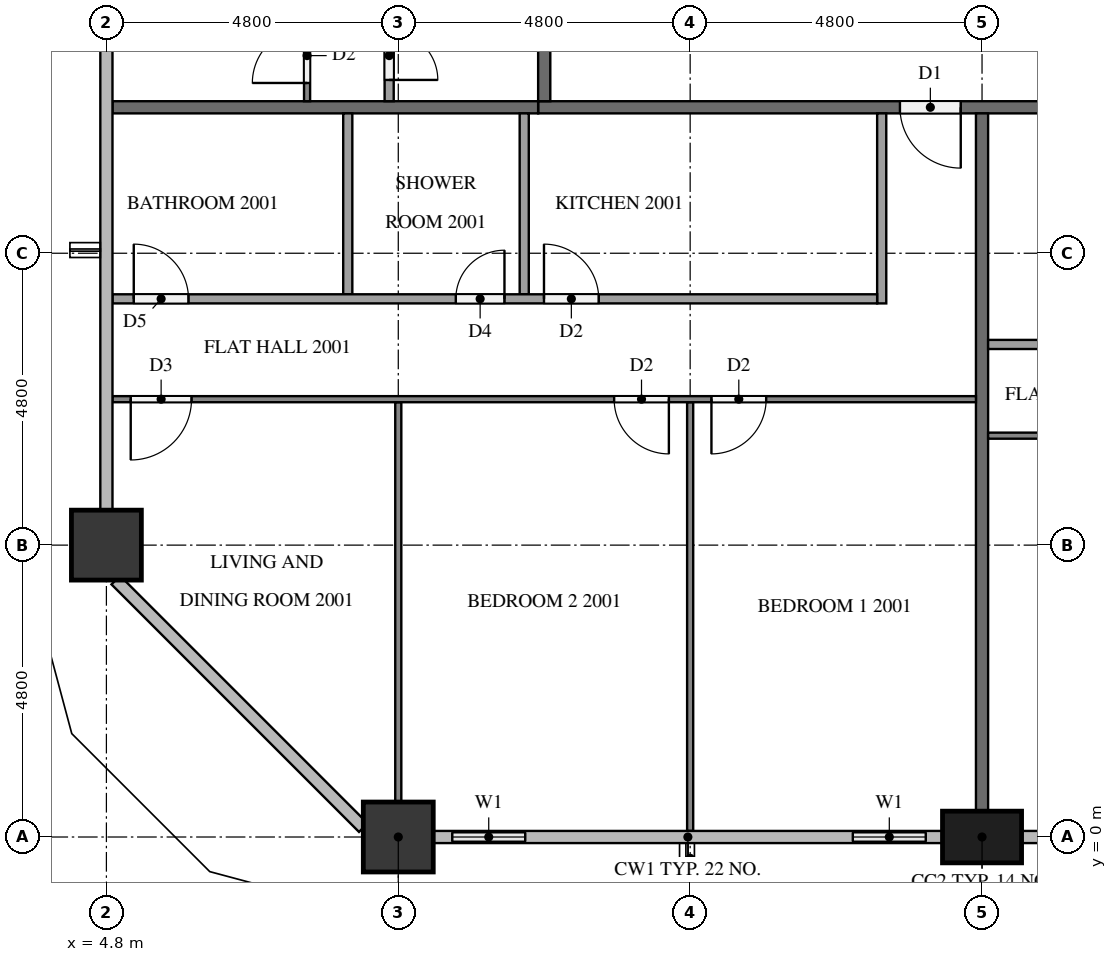
"""IFC4 building model, lengths in metres.
Left out: names, types, materials, properties, quantities, classifications, styles, units other than length and angle.
Written with IfcOpenShell. Run it as: python <this file> out.ifc"""

import sys

from ifc_helpers import new_model, si_unit, direction, frame, frame_2d, origin, origin_2d, place, context, subcontext, project, spatial, rectangle, extrude, element, fill, save


model = new_model("IFC4")
c1 = context("Model", 3, precision=1e-05, world=origin(), true_north=direction((0.0, 1.0)))
c2 = subcontext(c1, "Body", "Model", "MODEL_VIEW")
j1 = project(units=[si_unit("LENGTHUNIT", "METRE"), si_unit("PLANEANGLEUNIT", "RADIAN")], contexts=[c1])
p1 = place(None, origin())
s1 = spatial("IfcSite", under=j1, at=p1, CompositionType="ELEMENT")
p2 = place(p1, origin())
s2 = spatial("IfcBuilding", under=s1, at=p2, CompositionType="ELEMENT")
p3 = place(p2, frame((0.0, 0.0, 80.3)))
s3 = spatial("IfcBuildingStorey", under=s2, at=p3, CompositionType="ELEMENT", Elevation=80.3)
p4 = place(p3, frame((9.6, 0.0, 0.0), z_axis=(0.0, 0.0, 1.0), x_axis=(1.0, 0.0, 0.0)))
e1 = element("IfcColumn", 1, at=p4, inside=s3, PredefinedType="COLUMN", context=c2, shape_type="SweptSolid", body=[
    extrude(rectangle(XDim=1.15, YDim=1.15, at=origin_2d()), origin(), (0.0, 0.0, 1.0), 3.1),
])
p5 = place(p3, frame((19.2, 0.0, 0.0), z_axis=(0.0, 0.0, 1.0), x_axis=(1.0, 0.0, 0.0)))
e2 = element("IfcColumn", 2, at=p5, inside=s3, PredefinedType="COLUMN", context=c2, shape_type="SweptSolid", body=[
    extrude(rectangle(XDim=1.3, YDim=0.85, at=origin_2d()), origin(), (0.0, 0.0, 1.0), 3.1),
])
p6 = place(p3, frame((4.8, 4.8, 0.0), z_axis=(0.0, 0.0, 1.0), x_axis=(1.0, 0.0, 0.0)))
e3 = element("IfcColumn", 3, at=p6, inside=s3, PredefinedType="COLUMN", context=c2, shape_type="SweptSolid", body=[
    extrude(rectangle(XDim=1.15, YDim=1.15, at=origin_2d()), origin(), (0.0, 0.0, 1.0), 3.1),
])
p7 = place(p3, frame((10.175, 0.0, 0.0), z_axis=(0.0, 0.0, 1.0), x_axis=(1.0, 0.0, 0.0)))
e4 = element("IfcWall", 4, at=p7, inside=s3, PredefinedType="SOLIDWALL", context=c2, shape_type="SweptSolid", body=[
    extrude(rectangle(XDim=1.825, YDim=0.15, at=frame_2d((0.913, 0.0))), origin(), (0.0, 0.0, 1.0), 3.1),
])
p8 = place(p7, frame((0.312, 0.0, 0.9)))
e5 = element("IfcOpeningElement", 5, at=p8, cuts=e4, PredefinedType="OPENING", context=c2, shape_type="SweptSolid", body=[
    extrude(rectangle(XDim=1.2, YDim=1.4, at=frame_2d((0.6, 0.7))), frame((0.0, 0.085, 0.0), z_axis=(0.0, -1.0, 0.0), x_axis=(1.0, 0.0, 0.0)), (0.0, 0.0, 1.0), 0.17),
])
p9 = place(p3, frame((16.8, 0.0, 0.0), z_axis=(0.0, 0.0, 1.0), x_axis=(1.0, 0.0, 0.0)))
e6 = element("IfcWall", 6, at=p9, inside=s3, PredefinedType="SOLIDWALL", context=c2, shape_type="SweptSolid", body=[
    extrude(rectangle(XDim=1.75, YDim=0.15, at=frame_2d((0.875, 0.0))), origin(), (0.0, 0.0, 1.0), 3.1),
])
p10 = place(p9, frame((0.275, 0.0, 0.9)))
e7 = element("IfcOpeningElement", 7, at=p10, cuts=e6, PredefinedType="OPENING", context=c2, shape_type="SweptSolid", body=[
    extrude(rectangle(XDim=1.2, YDim=1.4, at=frame_2d((0.6, 0.7))), frame((0.0, 0.085, 0.0), z_axis=(0.0, -1.0, 0.0), x_axis=(1.0, 0.0, 0.0)), (0.0, 0.0, 1.0), 0.17),
])
p11 = place(p3, frame((19.85, 0.0, 0.0), z_axis=(0.0, 0.0, 1.0), x_axis=(1.0, 0.0, 0.0)))
e8 = element("IfcWall", 8, at=p11, inside=s3, PredefinedType="SOLIDWALL", context=c2, shape_type="SweptSolid", body=[
    extrude(rectangle(XDim=1.75, YDim=0.15, at=frame_2d((0.875, 0.0))), origin(), (0.0, 0.0, 1.0), 3.1),
])
p12 = place(p11, frame((0.275, 0.0, 0.9)))
e9 = element("IfcOpeningElement", 9, at=p12, cuts=e8, PredefinedType="OPENING", context=c2, shape_type="SweptSolid", body=[
    extrude(rectangle(XDim=1.2, YDim=1.4, at=frame_2d((0.6, 0.7))), frame((0.0, 0.085, 0.0), z_axis=(0.0, -1.0, 0.0), x_axis=(1.0, 0.0, 0.0)), (0.0, 0.0, 1.0), 0.17),
])
p13 = place(p3, frame((50.5, 12.0, 0.0), z_axis=(0.0, 0.0, 1.0), x_axis=(-1.0, 0.0, 0.0)))
e10 = element("IfcWall", 10, at=p13, inside=s3, PredefinedType="PARTITIONING", context=c2, shape_type="SweptSolid", body=[
    extrude(rectangle(XDim=38.6, YDim=0.2, at=frame_2d((19.3, 0.0))), origin(), (0.0, 0.0, 1.0), 3.1),
])
p14 = place(p13, frame((31.65, 0.0, 0.0)))
e11 = element("IfcOpeningElement", 11, at=p14, cuts=e10, PredefinedType="OPENING", context=c2, shape_type="SweptSolid", body=[
    extrude(rectangle(XDim=1.0, YDim=2.1, at=frame_2d((0.5, 1.05))), frame((0.0, 0.11, 0.0), z_axis=(0.0, -1.0, 0.0), x_axis=(1.0, 0.0, 0.0)), (0.0, 0.0, 1.0), 0.22),
])
p15 = place(p13, frame((14.85, 0.0, 0.0)))
e12 = element("IfcOpeningElement", 12, at=p15, cuts=e10, PredefinedType="OPENING", context=c2, shape_type="SweptSolid", body=[
    extrude(rectangle(XDim=1.0, YDim=2.1, at=frame_2d((0.5, 1.05))), frame((0.0, 0.11, 0.0), z_axis=(0.0, -1.0, 0.0), x_axis=(1.0, 0.0, 0.0)), (0.0, 0.0, 1.0), 0.22),
])
p16 = place(p13, frame((13.15, 0.0, 0.0)))
e13 = element("IfcOpeningElement", 13, at=p16, cuts=e10, PredefinedType="OPENING", context=c2, shape_type="SweptSolid", body=[
    extrude(rectangle(XDim=1.0, YDim=2.1, at=frame_2d((0.5, 1.05))), frame((0.0, 0.11, 0.0), z_axis=(0.0, -1.0, 0.0), x_axis=(1.0, 0.0, 0.0)), (0.0, 0.0, 1.0), 0.22),
])
p17 = place(p3, frame((12.0, 12.1, 0.0), z_axis=(0.0, 0.0, 1.0), x_axis=(0.0, 1.0, 0.0)))
e14 = element("IfcWall", 14, at=p17, inside=s3, PredefinedType="PARTITIONING", context=c2, shape_type="SweptSolid", body=[
    extrude(rectangle(XDim=28.6, YDim=0.2, at=frame_2d((14.3, 0.0))), origin(), (0.0, 0.0, 1.0), 3.1),
])
p18 = place(p17, frame((17.05, 0.0, 0.0)))
e15 = element("IfcOpeningElement", 15, at=p18, cuts=e14, PredefinedType="OPENING", context=c2, shape_type="SweptSolid", body=[
    extrude(rectangle(XDim=1.0, YDim=2.1, at=frame_2d((0.5, 1.05))), frame((0.0, 0.11, 0.0), z_axis=(0.0, -1.0, 0.0), x_axis=(1.0, 0.0, 0.0)), (0.0, 0.0, 1.0), 0.22),
])
p19 = place(p17, frame((15.35, 0.0, 0.0)))
e16 = element("IfcOpeningElement", 16, at=p19, cuts=e14, PredefinedType="OPENING", context=c2, shape_type="SweptSolid", body=[
    extrude(rectangle(XDim=1.0, YDim=2.1, at=frame_2d((0.5, 1.05))), frame((0.0, 0.11, 0.0), z_axis=(0.0, -1.0, 0.0), x_axis=(1.0, 0.0, 0.0)), (0.0, 0.0, 1.0), 0.22),
])
p20 = place(p17, frame((8.15, 0.0, 0.0)))
e17 = element("IfcOpeningElement", 17, at=p20, cuts=e14, PredefinedType="OPENING", context=c2, shape_type="SweptSolid", body=[
    extrude(rectangle(XDim=1.0, YDim=2.1, at=frame_2d((0.5, 1.05))), frame((0.0, 0.11, 0.0), z_axis=(0.0, -1.0, 0.0), x_axis=(1.0, 0.0, 0.0)), (0.0, 0.0, 1.0), 0.22),
])
p21 = place(p3, frame((19.2, 11.9, 0.0), z_axis=(0.0, 0.0, 1.0), x_axis=(0.0, -1.0, 0.0)))
e18 = element("IfcWall", 18, at=p21, inside=s3, PredefinedType="PARTITIONING", context=c2, shape_type="SweptSolid", body=[
    extrude(rectangle(XDim=11.475, YDim=0.2, at=frame_2d((5.737, 0.0))), origin(), (0.0, 0.0, 1.0), 3.1),
])
p22 = place(p3, frame((4.9, 12.0, 0.0), z_axis=(0.0, 0.0, 1.0), x_axis=(1.0, 0.0, 0.0)))
e19 = element("IfcWall", 19, at=p22, inside=s3, PredefinedType="PARTITIONING", context=c2, shape_type="SweptSolid", body=[
    extrude(rectangle(XDim=7.0, YDim=0.2, at=frame_2d((3.5, 0.0))), origin(), (0.0, 0.0, 1.0), 3.1),
])
p23 = place(p3, frame((14.4, 7.15, 0.0), z_axis=(0.0, 0.0, 1.0), x_axis=(0.0, -1.0, 0.0)))
e20 = element("IfcWall", 20, at=p23, inside=s3, PredefinedType="PARTITIONING", context=c2, shape_type="SweptSolid", body=[
    extrude(rectangle(XDim=7.05, YDim=0.1, at=frame_2d((3.525, 0.0))), origin(), (0.0, 0.0, 1.0), 3.1),
])
p24 = place(p3, frame((9.6, 7.15, 0.0), z_axis=(0.0, 0.0, 1.0), x_axis=(0.0, -1.0, 0.0)))
e21 = element("IfcWall", 21, at=p24, inside=s3, PredefinedType="PARTITIONING", context=c2, shape_type="SweptSolid", body=[
    extrude(rectangle(XDim=6.575, YDim=0.1, at=frame_2d((3.288, 0.0))), origin(), (0.0, 0.0, 1.0), 3.1),
])
p25 = place(p3, frame((19.1, 7.2, 0.0), z_axis=(0.0, 0.0, 1.0), x_axis=(-1.0, 0.0, 0.0)))
e22 = element("IfcWall", 22, at=p25, inside=s3, PredefinedType="PARTITIONING", context=c2, shape_type="SweptSolid", body=[
    extrude(rectangle(XDim=14.2, YDim=0.1, at=frame_2d((7.1, 0.0))), origin(), (0.0, 0.0, 1.0), 3.1),
])
p26 = place(p25, frame((3.45, 0.0, 0.0)))
e23 = element("IfcOpeningElement", 23, at=p26, cuts=e22, PredefinedType="OPENING", context=c2, shape_type="SweptSolid", body=[
    extrude(rectangle(XDim=0.9, YDim=2.1, at=frame_2d((0.45, 1.05))), frame((0.0, 0.06, 0.0), z_axis=(0.0, -1.0, 0.0), x_axis=(1.0, 0.0, 0.0)), (0.0, 0.0, 1.0), 0.12),
])
p27 = place(p25, frame((5.05, 0.0, 0.0)))
e24 = element("IfcOpeningElement", 24, at=p27, cuts=e22, PredefinedType="OPENING", context=c2, shape_type="SweptSolid", body=[
    extrude(rectangle(XDim=0.9, YDim=2.1, at=frame_2d((0.45, 1.05))), frame((0.0, 0.06, 0.0), z_axis=(0.0, -1.0, 0.0), x_axis=(1.0, 0.0, 0.0)), (0.0, 0.0, 1.0), 0.12),
])
p28 = place(p25, frame((12.9, 0.0, 0.0)))
e25 = element("IfcOpeningElement", 25, at=p28, cuts=e22, PredefinedType="OPENING", context=c2, shape_type="SweptSolid", body=[
    extrude(rectangle(XDim=1.0, YDim=2.1, at=frame_2d((0.5, 1.05))), frame((0.0, 0.06, 0.0), z_axis=(0.0, -1.0, 0.0), x_axis=(1.0, 0.0, 0.0)), (0.0, 0.0, 1.0), 0.12),
])
for number, where, z_axis, x_axis in (
    (26, (11.671, 11.9, 0.0), (0.0, 0.0, 1.0), (0.0, -1.0, 0.0)),
    (27, (8.769, 11.9, 0.0), (0.0, 0.0, 1.0), (0.0, -1.0, 0.0)),
):
    element("IfcWall", number, at=place(p3, frame(where, z_axis=z_axis, x_axis=x_axis)), inside=s3, PredefinedType="PARTITIONING", context=c2, shape_type="SweptSolid", body=[
        extrude(rectangle(XDim=2.975, YDim=0.15, at=frame_2d((1.487, 0.0))), origin(), (0.0, 0.0, 1.0), 3.1),
    ])
p29 = place(p3, frame((17.55, 11.9, 0.0), z_axis=(0.0, 0.0, 1.0), x_axis=(0.0, -1.0, 0.0)))
e28 = element("IfcWall", 28, at=p29, inside=s3, PredefinedType="PARTITIONING", context=c2, shape_type="SweptSolid", body=[
    extrude(rectangle(XDim=3.125, YDim=0.15, at=frame_2d((1.562, 0.0))), origin(), (0.0, 0.0, 1.0), 3.1),
])
p30 = place(p3, frame((4.9, 8.85, 0.0), z_axis=(0.0, 0.0, 1.0), x_axis=(1.0, 0.0, 0.0)))
e29 = element("IfcWall", 29, at=p30, inside=s3, PredefinedType="PARTITIONING", context=c2, shape_type="SweptSolid", body=[
    extrude(rectangle(XDim=12.575, YDim=0.15, at=frame_2d((6.288, 0.0))), origin(), (0.0, 0.0, 1.0), 3.1),
])
p31 = place(p30, frame((7.096, 0.0, 0.0)))
e30 = element("IfcOpeningElement", 30, at=p31, cuts=e29, PredefinedType="OPENING", context=c2, shape_type="SweptSolid", body=[
    extrude(rectangle(XDim=0.9, YDim=2.1, at=frame_2d((0.45, 1.05))), frame((0.0, 0.085, 0.0), z_axis=(0.0, -1.0, 0.0), x_axis=(1.0, 0.0, 0.0)), (0.0, 0.0, 1.0), 0.17),
])
p32 = place(p30, frame((5.646, 0.0, 0.0)))
e31 = element("IfcOpeningElement", 31, at=p32, cuts=e29, PredefinedType="OPENING", context=c2, shape_type="SweptSolid", body=[
    extrude(rectangle(XDim=0.8, YDim=2.1, at=frame_2d((0.4, 1.05))), frame((0.0, 0.085, 0.0), z_axis=(0.0, -1.0, 0.0), x_axis=(1.0, 0.0, 0.0)), (0.0, 0.0, 1.0), 0.17),
])
p33 = place(p30, frame((0.35, 0.0, 0.0)))
e32 = element("IfcOpeningElement", 32, at=p33, cuts=e29, PredefinedType="OPENING", context=c2, shape_type="SweptSolid", body=[
    extrude(rectangle(XDim=0.9, YDim=2.1, at=frame_2d((0.45, 1.05))), frame((0.0, 0.085, 0.0), z_axis=(0.0, -1.0, 0.0), x_axis=(1.0, 0.0, 0.0)), (0.0, 0.0, 1.0), 0.17),
])
p34 = place(p3, frame((35.9, 6.6, 0.0), z_axis=(0.0, 0.0, 1.0), x_axis=(-1.0, 0.0, 0.0)))
e33 = element("IfcWall", 33, at=p34, inside=s3, PredefinedType="PARTITIONING", context=c2, shape_type="SweptSolid", body=[
    extrude(rectangle(XDim=16.6, YDim=0.1, at=frame_2d((8.3, 0.0))), origin(), (0.0, 0.0, 1.0), 3.1),
])
p35 = place(p34, frame((0.3, 0.0, 0.0)))
e34 = element("IfcOpeningElement", 34, at=p35, cuts=e33, PredefinedType="OPENING", context=c2, shape_type="SweptSolid", body=[
    extrude(rectangle(XDim=1.0, YDim=2.1, at=frame_2d((0.5, 1.05))), frame((0.0, 0.06, 0.0), z_axis=(0.0, -1.0, 0.0), x_axis=(1.0, 0.0, 0.0)), (0.0, 0.0, 1.0), 0.12),
])
p36 = place(p34, frame((10.65, 0.0, 0.0)))
e35 = element("IfcOpeningElement", 35, at=p36, cuts=e33, PredefinedType="OPENING", context=c2, shape_type="SweptSolid", body=[
    extrude(rectangle(XDim=0.9, YDim=2.1, at=frame_2d((0.45, 1.05))), frame((0.0, 0.06, 0.0), z_axis=(0.0, -1.0, 0.0), x_axis=(1.0, 0.0, 0.0)), (0.0, 0.0, 1.0), 0.12),
])
p37 = place(p34, frame((12.25, 0.0, 0.0)))
e36 = element("IfcOpeningElement", 36, at=p37, cuts=e33, PredefinedType="OPENING", context=c2, shape_type="SweptSolid", body=[
    extrude(rectangle(XDim=0.9, YDim=2.1, at=frame_2d((0.45, 1.05))), frame((0.0, 0.06, 0.0), z_axis=(0.0, -1.0, 0.0), x_axis=(1.0, 0.0, 0.0)), (0.0, 0.0, 1.0), 0.12),
])
p38 = place(p3, frame((19.3, 8.1, 0.0), z_axis=(0.0, 0.0, 1.0), x_axis=(1.0, 0.0, 0.0)))
e37 = element("IfcWall", 37, at=p38, inside=s3, PredefinedType="PARTITIONING", context=c2, shape_type="SweptSolid", body=[
    extrude(rectangle(XDim=14.975, YDim=0.15, at=frame_2d((7.487, 0.0))), origin(), (0.0, 0.0, 1.0), 3.1),
])
p39 = place(p38, frame((13.875, 0.0, 0.0)))
e38 = element("IfcOpeningElement", 38, at=p39, cuts=e37, PredefinedType="OPENING", context=c2, shape_type="SweptSolid", body=[
    extrude(rectangle(XDim=0.8, YDim=2.1, at=frame_2d((0.4, 1.05))), frame((0.0, 0.085, 0.0), z_axis=(0.0, -1.0, 0.0), x_axis=(1.0, 0.0, 0.0)), (0.0, 0.0, 1.0), 0.17),
])
p40 = place(p38, frame((4.933, 0.0, 0.0)))
e39 = element("IfcOpeningElement", 39, at=p40, cuts=e37, PredefinedType="OPENING", context=c2, shape_type="SweptSolid", body=[
    extrude(rectangle(XDim=0.9, YDim=2.1, at=frame_2d((0.45, 1.05))), frame((0.0, 0.085, 0.0), z_axis=(0.0, -1.0, 0.0), x_axis=(1.0, 0.0, 0.0)), (0.0, 0.0, 1.0), 0.17),
])
p41 = place(p38, frame((3.383, 0.0, 0.0)))
e40 = element("IfcOpeningElement", 40, at=p41, cuts=e37, PredefinedType="OPENING", context=c2, shape_type="SweptSolid", body=[
    extrude(rectangle(XDim=0.9, YDim=2.1, at=frame_2d((0.45, 1.05))), frame((0.0, 0.085, 0.0), z_axis=(0.0, -1.0, 0.0), x_axis=(1.0, 0.0, 0.0)), (0.0, 0.0, 1.0), 0.17),
])
p42 = place(p3, frame((8.1, 12.1, 0.0), z_axis=(0.0, 0.0, 1.0), x_axis=(0.0, 1.0, 0.0)))
e41 = element("IfcWall", 41, at=p42, inside=s3, PredefinedType="PARTITIONING", context=c2, shape_type="SweptSolid", body=[
    extrude(rectangle(XDim=9.4, YDim=0.1, at=frame_2d((4.7, 0.0))), origin(), (0.0, 0.0, 1.0), 3.1),
])
p43 = place(p42, frame((8.1, 0.0, 0.0)))
e42 = element("IfcOpeningElement", 42, at=p43, cuts=e41, PredefinedType="OPENING", context=c2, shape_type="SweptSolid", body=[
    extrude(rectangle(XDim=1.0, YDim=2.1, at=frame_2d((0.5, 1.05))), frame((0.0, 0.06, 0.0), z_axis=(0.0, -1.0, 0.0), x_axis=(1.0, 0.0, 0.0)), (0.0, 0.0, 1.0), 0.12),
])
p44 = place(p42, frame((0.3, 0.0, 0.0)))
e43 = element("IfcOpeningElement", 43, at=p44, cuts=e41, PredefinedType="OPENING", context=c2, shape_type="SweptSolid", body=[
    extrude(rectangle(XDim=0.9, YDim=2.1, at=frame_2d((0.45, 1.05))), frame((0.0, 0.06, 0.0), z_axis=(0.0, -1.0, 0.0), x_axis=(1.0, 0.0, 0.0)), (0.0, 0.0, 1.0), 0.12),
])
p45 = place(p3, frame((9.45, 19.875, 0.0), z_axis=(0.0, 0.0, 1.0), x_axis=(0.0, -1.0, 0.0)))
e44 = element("IfcWall", 44, at=p45, inside=s3, PredefinedType="PARTITIONING", context=c2, shape_type="SweptSolid", body=[
    extrude(rectangle(XDim=7.775, YDim=0.15, at=frame_2d((3.887, 0.0))), origin(), (0.0, 0.0, 1.0), 3.1),
])
p46 = place(p45, frame((0.3, 0.0, 0.0)))
e45 = element("IfcOpeningElement", 45, at=p46, cuts=e44, PredefinedType="OPENING", context=c2, shape_type="SweptSolid", body=[
    extrude(rectangle(XDim=0.9, YDim=2.1, at=frame_2d((0.45, 1.05))), frame((0.0, 0.085, 0.0), z_axis=(0.0, -1.0, 0.0), x_axis=(1.0, 0.0, 0.0)), (0.0, 0.0, 1.0), 0.17),
])
p47 = place(p45, frame((6.625, 0.0, 0.0)))
e46 = element("IfcOpeningElement", 46, at=p47, cuts=e44, PredefinedType="OPENING", context=c2, shape_type="SweptSolid", body=[
    extrude(rectangle(XDim=0.8, YDim=2.1, at=frame_2d((0.4, 1.05))), frame((0.0, 0.085, 0.0), z_axis=(0.0, -1.0, 0.0), x_axis=(1.0, 0.0, 0.0)), (0.0, 0.0, 1.0), 0.17),
])
p48 = place(p8, origin())
e47 = element("IfcWindow", 47, at=p48, inside=s3, PartitioningType="SINGLE_PANEL", PredefinedType="WINDOW", context=c2, shape_type="SweptSolid", body=[
    extrude(rectangle(XDim=1.2, YDim=1.4, at=frame_2d((0.6, 0.7))), frame((0.0, 0.03, 0.0), z_axis=(0.0, -1.0, 0.0), x_axis=(1.0, 0.0, 0.0)), (0.0, 0.0, 1.0), 0.06),
])
fill(e5, e47)
p49 = place(p10, origin())
e48 = element("IfcWindow", 48, at=p49, inside=s3, PartitioningType="SINGLE_PANEL", PredefinedType="WINDOW", context=c2, shape_type="SweptSolid", body=[
    extrude(rectangle(XDim=1.2, YDim=1.4, at=frame_2d((0.6, 0.7))), frame((0.0, 0.03, 0.0), z_axis=(0.0, -1.0, 0.0), x_axis=(1.0, 0.0, 0.0)), (0.0, 0.0, 1.0), 0.06),
])
fill(e7, e48)
p50 = place(p14, origin())
e49 = element("IfcDoor", 49, at=p50, inside=s3, OperationType="SINGLE_SWING_LEFT", PredefinedType="DOOR", context=c2, shape_type="SweptSolid", body=[
    extrude(rectangle(XDim=1.0, YDim=2.1, at=frame_2d((0.5, 1.05))), frame((0.0, 0.025, 0.0), z_axis=(0.0, -1.0, 0.0), x_axis=(1.0, 0.0, 0.0)), (0.0, 0.0, 1.0), 0.05),
])
fill(e11, e49)
p51 = place(p26, origin())
e50 = element("IfcDoor", 50, at=p51, inside=s3, OperationType="SINGLE_SWING_RIGHT", PredefinedType="DOOR", context=c2, shape_type="SweptSolid", body=[
    extrude(rectangle(XDim=0.9, YDim=2.1, at=frame_2d((0.45, 1.05))), frame((0.0, 0.025, 0.0), z_axis=(0.0, -1.0, 0.0), x_axis=(1.0, 0.0, 0.0)), (0.0, 0.0, 1.0), 0.05),
])
fill(e23, e50)
p52 = place(p27, origin())
e51 = element("IfcDoor", 51, at=p52, inside=s3, OperationType="SINGLE_SWING_LEFT", PredefinedType="DOOR", context=c2, shape_type="SweptSolid", body=[
    extrude(rectangle(XDim=0.9, YDim=2.1, at=frame_2d((0.45, 1.05))), frame((0.0, 0.025, 0.0), z_axis=(0.0, -1.0, 0.0), x_axis=(1.0, 0.0, 0.0)), (0.0, 0.0, 1.0), 0.05),
])
fill(e24, e51)
p53 = place(p28, origin())
e52 = element("IfcDoor", 52, at=p53, inside=s3, OperationType="SINGLE_SWING_RIGHT", PredefinedType="DOOR", context=c2, shape_type="SweptSolid", body=[
    extrude(rectangle(XDim=1.0, YDim=2.1, at=frame_2d((0.5, 1.05))), frame((0.0, 0.025, 0.0), z_axis=(0.0, -1.0, 0.0), x_axis=(1.0, 0.0, 0.0)), (0.0, 0.0, 1.0), 0.05),
])
fill(e25, e52)
p54 = place(p31, origin())
e53 = element("IfcDoor", 53, at=p54, inside=s3, OperationType="SINGLE_SWING_LEFT", PredefinedType="DOOR", context=c2, shape_type="SweptSolid", body=[
    extrude(rectangle(XDim=0.9, YDim=2.1, at=frame_2d((0.45, 1.05))), frame((0.0, 0.025, 0.0), z_axis=(0.0, -1.0, 0.0), x_axis=(1.0, 0.0, 0.0)), (0.0, 0.0, 1.0), 0.05),
])
fill(e30, e53)
p55 = place(p32, origin())
e54 = element("IfcDoor", 54, at=p55, inside=s3, OperationType="SINGLE_SWING_RIGHT", PredefinedType="DOOR", context=c2, shape_type="SweptSolid", body=[
    extrude(rectangle(XDim=0.8, YDim=2.1, at=frame_2d((0.4, 1.05))), frame((0.0, 0.025, 0.0), z_axis=(0.0, -1.0, 0.0), x_axis=(1.0, 0.0, 0.0)), (0.0, 0.0, 1.0), 0.05),
])
fill(e31, e54)
p56 = place(p33, origin())
e55 = element("IfcDoor", 55, at=p56, inside=s3, OperationType="SINGLE_SWING_LEFT", PredefinedType="DOOR", context=c2, shape_type="SweptSolid", body=[
    extrude(rectangle(XDim=0.9, YDim=2.1, at=frame_2d((0.45, 1.05))), frame((0.0, 0.025, 0.0), z_axis=(0.0, -1.0, 0.0), x_axis=(1.0, 0.0, 0.0)), (0.0, 0.0, 1.0), 0.05),
])
fill(e32, e55)
p57 = place(p44, origin())
e56 = element("IfcDoor", 56, at=p57, inside=s3, OperationType="SINGLE_SWING_LEFT", PredefinedType="DOOR", context=c2, shape_type="SweptSolid", body=[
    extrude(rectangle(XDim=0.9, YDim=2.1, at=frame_2d((0.45, 1.05))), frame((0.0, 0.025, 0.0), z_axis=(0.0, -1.0, 0.0), x_axis=(1.0, 0.0, 0.0)), (0.0, 0.0, 1.0), 0.05),
])
fill(e43, e56)
p58 = place(p47, origin())
e57 = element("IfcDoor", 57, at=p58, inside=s3, OperationType="SINGLE_SWING_RIGHT", PredefinedType="DOOR", context=c2, shape_type="SweptSolid", body=[
    extrude(rectangle(XDim=0.8, YDim=2.1, at=frame_2d((0.4, 1.05))), frame((0.0, 0.025, 0.0), z_axis=(0.0, -1.0, 0.0), x_axis=(1.0, 0.0, 0.0)), (0.0, 0.0, 1.0), 0.05),
])
fill(e46, e57)
save(model, sys.argv[1])
